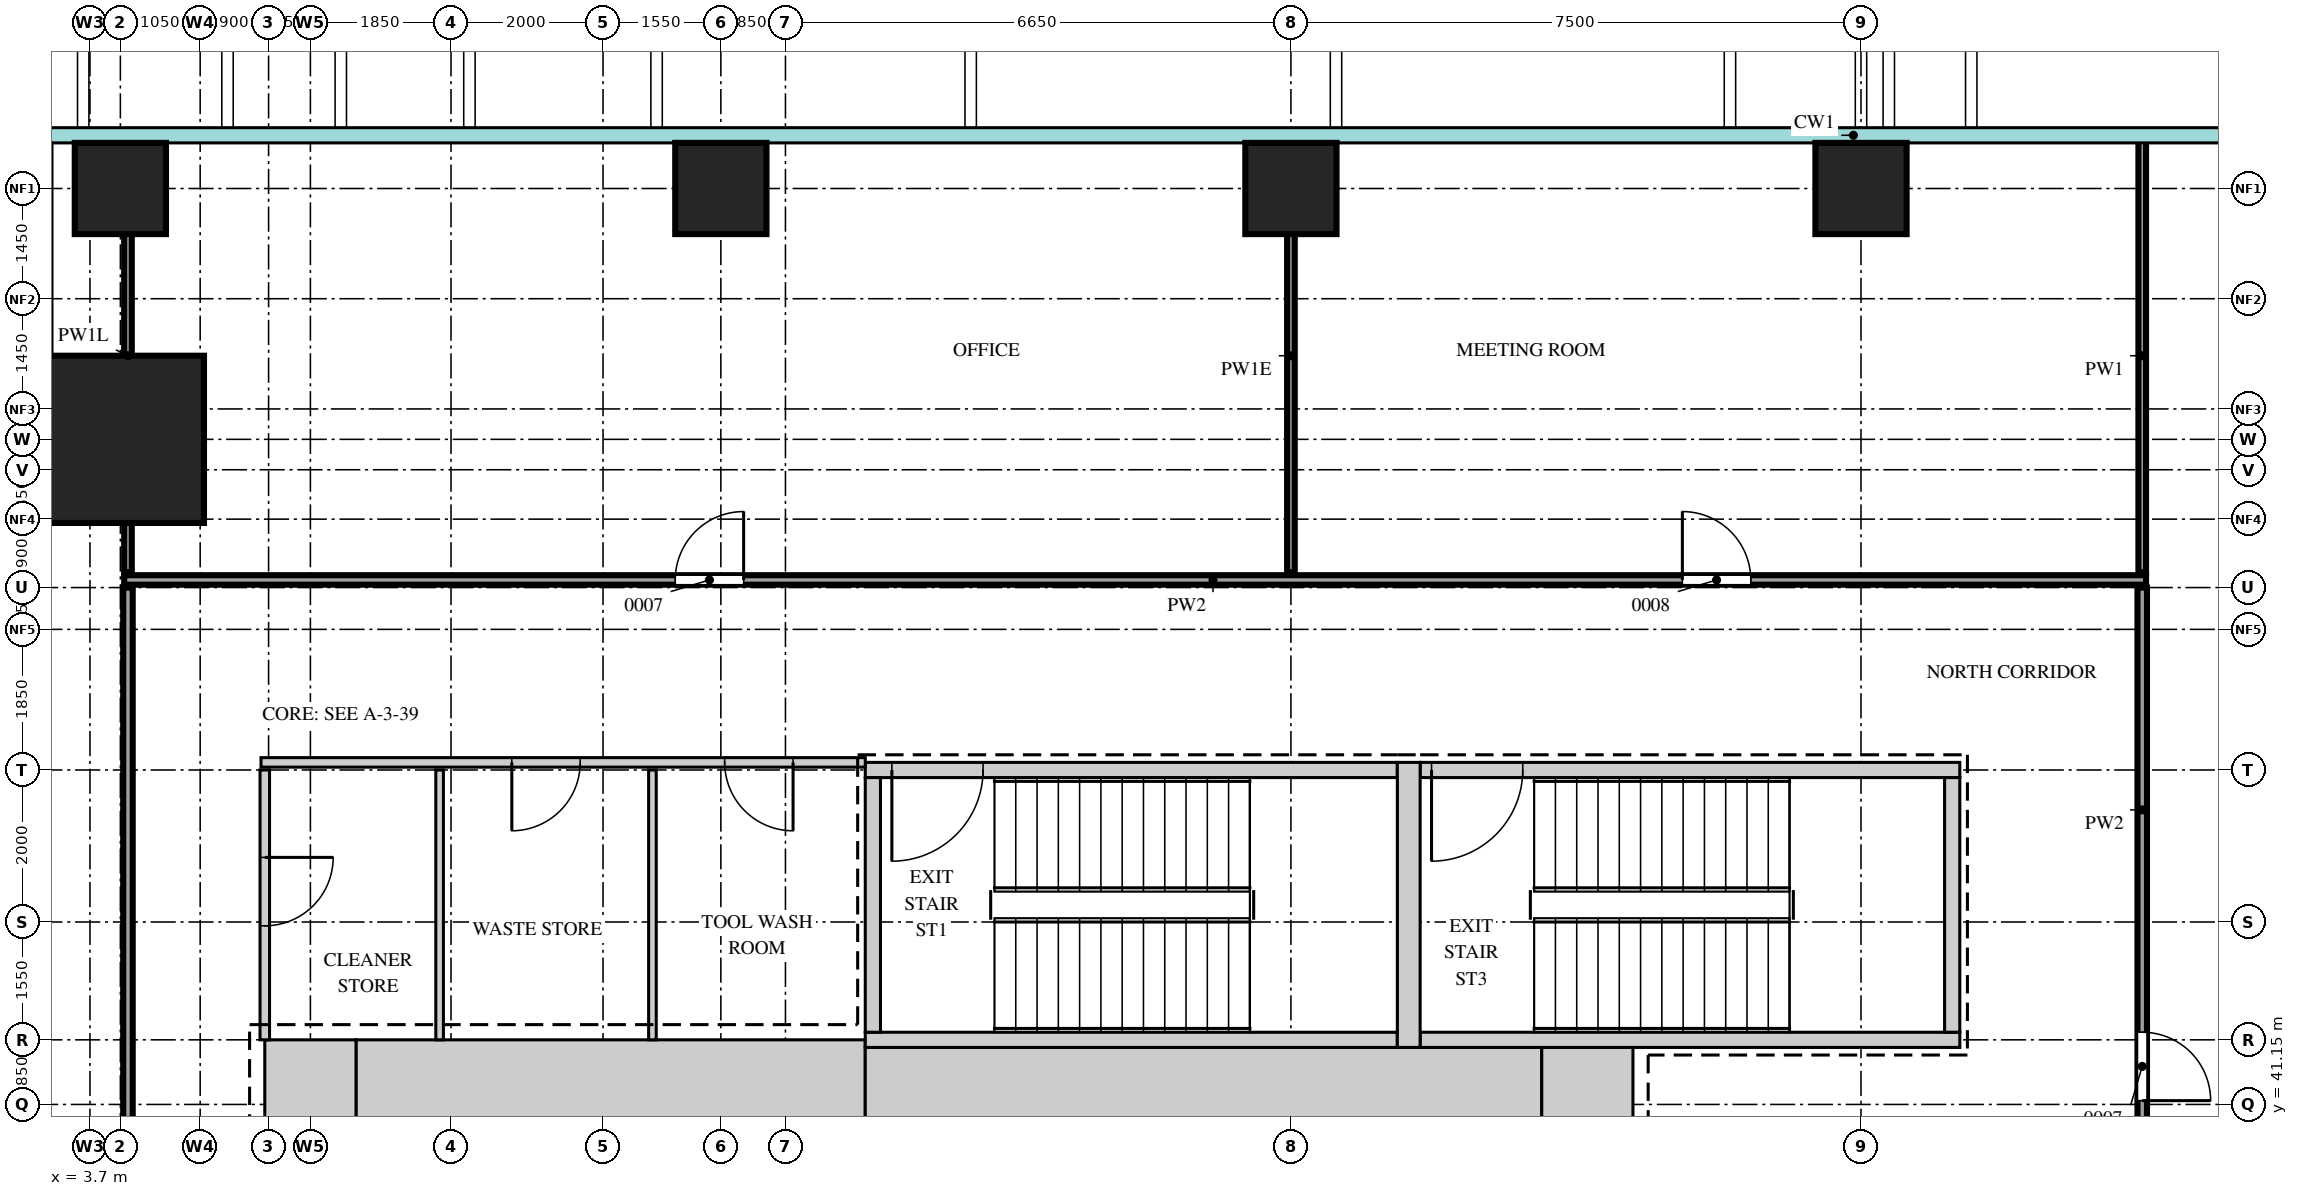
"""IFC4 building model, lengths in metres.
Left out: names, types, materials, properties, quantities, classifications, styles, units other than length and angle.
Written with IfcOpenShell. Run it as: python <this file> out.ifc"""

import sys

from ifc_helpers import new_model, si_unit, direction, frame, frame_2d, origin, origin_2d, place, context, subcontext, project, spatial, rectangle, extrude, source, transform, mapped, element, fill, save


model = new_model("IFC4")
c1 = context("Model", 3, precision=1e-05, world=origin(), true_north=direction((0.0, 1.0)))
c2 = subcontext(c1, "Body", "Model", "MODEL_VIEW")
j1 = project(units=[si_unit("LENGTHUNIT", "METRE"), si_unit("PLANEANGLEUNIT", "RADIAN")], contexts=[c1])
p1 = place(None, origin())
s1 = spatial("IfcSite", under=j1, at=p1, CompositionType="ELEMENT")
p2 = place(p1, origin())
s2 = spatial("IfcBuilding", under=s1, at=p2, CompositionType="ELEMENT")
p3 = place(p2, frame((0.0, 0.0, 60.0)))
s3 = spatial("IfcBuildingStorey", under=s2, at=p3, CompositionType="ELEMENT", Elevation=60.0)
m1 = source(origin(), c2, "Body", "SweptSolid", [
    extrude(rectangle(XDim=6.7, YDim=1.2, at=frame_2d((3.35, 0.0))), origin(), (0.0, 0.0, 1.0), 4.2),
])
p4 = place(p3, frame((7.2, 41.4, 0.0), z_axis=(0.0, 0.0, 1.0), x_axis=(1.0, 0.0, 0.0)))
e1 = element("IfcWall", 1, at=p4, inside=s3, PredefinedType="SHEAR", context=c2, shape_type="MappedRepresentation", body=[
    mapped(m1, transform((0.0, 0.0, 0.0))),
])
m2 = source(origin(), c2, "Body", "SweptSolid", [
    extrude(rectangle(XDim=8.9, YDim=1.1, at=frame_2d((4.45, 0.0))), origin(), (0.0, 0.0, 1.0), 4.2),
])
p5 = place(p3, frame((13.9, 41.35, 0.0), z_axis=(0.0, 0.0, 1.0), x_axis=(1.0, 0.0, 0.0)))
e2 = element("IfcWall", 2, at=p5, inside=s3, PredefinedType="SHEAR", context=c2, shape_type="MappedRepresentation", body=[
    mapped(m2, transform((0.0, 0.0, 0.0))),
])
m3 = source(origin(), c2, "Body", "SweptSolid", [
    extrude(rectangle(XDim=1.2, YDim=1.1, at=frame_2d((0.6, 0.0))), origin(), (0.0, 0.0, 1.0), 4.2),
])
p6 = place(p3, frame((22.8, 41.35, 0.0), z_axis=(0.0, 0.0, 1.0), x_axis=(1.0, 0.0, 0.0)))
e3 = element("IfcWall", 3, at=p6, inside=s3, PredefinedType="SHEAR", context=c2, shape_type="MappedRepresentation", body=[
    mapped(m3, transform((0.0, 0.0, 0.0))),
])
m4 = source(origin(), c2, "Body", "SweptSolid", [
    extrude(rectangle(XDim=1.2, YDim=1.2, at=frame_2d((0.6, 0.0))), origin(), (0.0, 0.0, 1.0), 4.2),
])
p7 = place(p3, frame((6.0, 41.4, 0.0), z_axis=(0.0, 0.0, 1.0), x_axis=(1.0, 0.0, 0.0)))
e4 = element("IfcWall", 4, at=p7, inside=s3, PredefinedType="SHEAR", context=c2, shape_type="MappedRepresentation", body=[
    mapped(m4, transform((0.0, 0.0, 0.0))),
])
m5 = source(origin(), c2, "Body", "SweptSolid", [
    extrude(rectangle(XDim=7.0, YDim=0.2, at=frame_2d((3.5, 0.0))), origin(), (0.0, 0.0, 1.0), 4.2),
])
p8 = place(p3, frame((13.9, 45.55, 0.0), z_axis=(0.0, 0.0, 1.0), x_axis=(1.0, 0.0, 0.0)))
e5 = element("IfcWall", 5, at=p8, inside=s3, PredefinedType="SHEAR", context=c2, shape_type="MappedRepresentation", body=[
    mapped(m5, transform((0.0, 0.0, 0.0))),
])
m6 = source(origin(), c2, "Body", "SweptSolid", [
    extrude(rectangle(XDim=1.2, YDim=2.1, at=frame_2d((0.6, 1.05))), frame((0.0, 0.11, 0.0), z_axis=(0.0, -1.0, 0.0), x_axis=(1.0, 0.0, 0.0)), (0.0, 0.0, 1.0), 0.22),
])
p9 = place(p8, frame((0.35, 0.0, 0.0)))
e6 = element("IfcOpeningElement", 6, at=p9, cuts=e5, PredefinedType="OPENING", context=c2, shape_type="MappedRepresentation", body=[
    mapped(m6, transform((0.0, 0.0, 0.0))),
])
p10 = place(p3, frame((13.9, 42.0, 0.0), z_axis=(0.0, 0.0, 1.0), x_axis=(1.0, 0.0, 0.0)))
e7 = element("IfcWall", 7, at=p10, inside=s3, PredefinedType="SHEAR", context=c2, shape_type="MappedRepresentation", body=[
    mapped(m5, transform((0.0, 0.0, 0.0))),
])
m7 = source(origin(), c2, "Body", "SweptSolid", [
    extrude(rectangle(XDim=7.1, YDim=0.2, at=frame_2d((3.55, 0.0))), origin(), (0.0, 0.0, 1.0), 4.2),
])
p11 = place(p3, frame((21.2, 45.55, 0.0), z_axis=(0.0, 0.0, 1.0), x_axis=(1.0, 0.0, 0.0)))
e8 = element("IfcWall", 8, at=p11, inside=s3, PredefinedType="SHEAR", context=c2, shape_type="MappedRepresentation", body=[
    mapped(m7, transform((0.0, 0.0, 0.0))),
])
p12 = place(p11, frame((0.15, 0.0, 0.0)))
e9 = element("IfcOpeningElement", 9, at=p12, cuts=e8, PredefinedType="OPENING", context=c2, shape_type="MappedRepresentation", body=[
    mapped(m6, transform((0.0, 0.0, 0.0))),
])
p13 = place(p3, frame((21.2, 42.0, 0.0), z_axis=(0.0, 0.0, 1.0), x_axis=(1.0, 0.0, 0.0)))
e10 = element("IfcWall", 10, at=p13, inside=s3, PredefinedType="SHEAR", context=c2, shape_type="MappedRepresentation", body=[
    mapped(m7, transform((0.0, 0.0, 0.0))),
])
m8 = source(origin(), c2, "Body", "SweptSolid", [
    extrude(rectangle(XDim=3.75, YDim=0.3, at=frame_2d((1.875, 0.0))), origin(), (0.0, 0.0, 1.0), 4.2),
])
p14 = place(p3, frame((21.05, 41.9, 0.0), z_axis=(0.0, 0.0, 1.0), x_axis=(0.0, 1.0, 0.0)))
e11 = element("IfcWall", 11, at=p14, inside=s3, PredefinedType="SHEAR", context=c2, shape_type="MappedRepresentation", body=[
    mapped(m8, transform((0.0, 0.0, 0.0))),
])
m9 = source(origin(), c2, "Body", "SweptSolid", [
    extrude(rectangle(XDim=3.35, YDim=0.2, at=frame_2d((1.675, 0.0))), origin(), (0.0, 0.0, 1.0), 4.2),
])
for number, where, z_axis, x_axis in (
    (12, (14.0, 42.1, 0.0), (0.0, 0.0, 1.0), (0.0, 1.0, 0.0)),
    (13, (28.2, 42.1, 0.0), (0.0, 0.0, 1.0), (0.0, 1.0, 0.0)),
):
    element("IfcWall", number, at=place(p3, frame(where, z_axis=z_axis, x_axis=x_axis)), inside=s3, PredefinedType="SHEAR", context=c2, shape_type="MappedRepresentation", body=[
        mapped(m9, transform((0.0, 0.0, 0.0))),
    ])
m10 = source(origin(), c2, "Body", "SweptSolid", [
    extrude(rectangle(XDim=2.2, YDim=2.2, at=origin_2d()), origin(), (0.0, 0.0, 1.0), 4.5),
])
p15 = place(p3, frame((4.1, 49.9, 0.0), z_axis=(0.0, 0.0, 1.0), x_axis=(1.0, 0.0, 0.0)))
e14 = element("IfcColumn", 14, at=p15, inside=s3, PredefinedType="COLUMN", context=c2, shape_type="MappedRepresentation", body=[
    mapped(m10, transform((0.0, 0.0, 0.0))),
])
m11 = source(origin(), c2, "Body", "SweptSolid", [
    extrude(rectangle(XDim=1.2, YDim=1.2, at=origin_2d()), origin(), (0.0, 0.0, 1.0), 4.2),
])
for number, where, z_axis, x_axis in (
    (15, (4.1, 53.2, 0.0), (0.0, 0.0, 1.0), (1.0, 0.0, 0.0)),
    (16, (12.0, 53.2, 0.0), (0.0, 0.0, 1.0), (1.0, 0.0, 0.0)),
    (17, (19.5, 53.2, 0.0), (0.0, 0.0, 1.0), (1.0, 0.0, 0.0)),
    (18, (27.0, 53.2, 0.0), (0.0, 0.0, 1.0), (1.0, 0.0, 0.0)),
):
    element("IfcColumn", number, at=place(p3, frame(where, z_axis=z_axis, x_axis=x_axis)), inside=s3, PredefinedType="COLUMN", context=c2, shape_type="MappedRepresentation", body=[
        mapped(m11, transform((0.0, 0.0, 0.0))),
    ])
m12 = source(origin(), c2, "Body", "SweptSolid", [
    extrude(rectangle(XDim=41.8, YDim=0.125, at=frame_2d((20.9, 0.0))), origin(), (0.0, 0.0, 1.0), 4.3),
])
p16 = place(p3, frame((4.2, 6.15, 0.0), z_axis=(0.0, 0.0, 1.0), x_axis=(0.0, 1.0, 0.0)))
e19 = element("IfcWall", 19, at=p16, inside=s3, PredefinedType="PARTITIONING", context=c2, shape_type="MappedRepresentation", body=[
    mapped(m12, transform((0.0, 0.0, 0.0))),
])
m13 = source(origin(), c2, "Body", "SweptSolid", [
    extrude(rectangle(XDim=0.9, YDim=2.1, at=frame_2d((0.45, 1.05))), frame((0.0, 0.073, 0.0), z_axis=(0.0, -1.0, 0.0), x_axis=(1.0, 0.0, 0.0)), (0.0, 0.0, 1.0), 0.145),
])
p17 = place(p16, frame((6.45, 0.0, 0.0)))
e20 = element("IfcOpeningElement", 20, at=p17, cuts=e19, PredefinedType="OPENING", context=c2, shape_type="MappedRepresentation", body=[
    mapped(m13, transform((0.0, 0.0, 0.0))),
])
m14 = source(origin(), c2, "Body", "SweptSolid", [
    extrude(rectangle(XDim=1.2, YDim=2.1, at=frame_2d((0.6, 1.05))), frame((0.0, 0.073, 0.0), z_axis=(0.0, -1.0, 0.0), x_axis=(1.0, 0.0, 0.0)), (0.0, 0.0, 1.0), 0.145),
])
p18 = place(p16, frame((25.05, 0.0, 0.0)))
e21 = element("IfcOpeningElement", 21, at=p18, cuts=e19, PredefinedType="OPENING", context=c2, shape_type="MappedRepresentation", body=[
    mapped(m14, transform((0.0, 0.0, 0.0))),
])
m15 = source(origin(), c2, "Body", "SweptSolid", [
    extrude(rectangle(XDim=10.15, YDim=0.125, at=frame_2d((5.075, 0.0))), origin(), (0.0, 0.0, 1.0), 4.3),
])
p19 = place(p3, frame((30.7, 37.8, 0.0), z_axis=(0.0, 0.0, 1.0), x_axis=(0.0, 1.0, 0.0)))
e22 = element("IfcWall", 22, at=p19, inside=s3, PredefinedType="PARTITIONING", context=c2, shape_type="MappedRepresentation", body=[
    mapped(m15, transform((0.0, 0.0, 0.0))),
])
p20 = place(p19, frame((3.4, 0.0, 0.0)))
e23 = element("IfcOpeningElement", 23, at=p20, cuts=e22, PredefinedType="OPENING", context=c2, shape_type="MappedRepresentation", body=[
    mapped(m13, transform((0.0, 0.0, 0.0))),
])
m16 = source(origin(), c2, "Body", "SweptSolid", [
    extrude(rectangle(XDim=3.55, YDim=0.125, at=frame_2d((1.775, 0.0))), origin(), (0.0, 0.0, 1.0), 4.3),
])
p21 = place(p3, frame((6.0, 42.0, 0.0), z_axis=(0.0, 0.0, 1.0), x_axis=(0.0, 1.0, 0.0)))
e24 = element("IfcWall", 24, at=p21, inside=s3, PredefinedType="PARTITIONING", context=c2, shape_type="MappedRepresentation", body=[
    mapped(m16, transform((0.0, 0.0, 0.0))),
])
p22 = place(p21, frame((1.5, 0.0, 0.0)))
e25 = element("IfcOpeningElement", 25, at=p22, cuts=e24, PredefinedType="OPENING", context=c2, shape_type="MappedRepresentation", body=[
    mapped(m13, transform((0.0, 0.0, 0.0))),
])
m17 = source(origin(), c2, "Body", "SweptSolid", [
    extrude(rectangle(XDim=3.55, YDim=0.1, at=frame_2d((1.775, 0.0))), origin(), (0.0, 0.0, 1.0), 4.3),
])
for number, where, z_axis, x_axis in (
    (26, (8.3, 42.0, 0.0), (0.0, 0.0, 1.0), (0.0, 1.0, 0.0)),
    (27, (11.1, 42.0, 0.0), (0.0, 0.0, 1.0), (0.0, 1.0, 0.0)),
):
    element("IfcWall", number, at=place(p3, frame(where, z_axis=z_axis, x_axis=x_axis)), inside=s3, PredefinedType="PARTITIONING", context=c2, shape_type="MappedRepresentation", body=[
        mapped(m17, transform((0.0, 0.0, 0.0))),
    ])
m18 = source(origin(), c2, "Body", "SweptSolid", [
    extrude(rectangle(XDim=7.95, YDim=0.125, at=frame_2d((3.975, 0.0))), origin(), (0.0, 0.0, 1.0), 4.3),
])
p23 = place(p3, frame((5.95, 45.65, 0.0), z_axis=(0.0, 0.0, 1.0), x_axis=(1.0, 0.0, 0.0)))
e28 = element("IfcWall", 28, at=p23, inside=s3, PredefinedType="PARTITIONING", context=c2, shape_type="MappedRepresentation", body=[
    mapped(m18, transform((0.0, 0.0, 0.0))),
])
p24 = place(p23, frame((3.3, 0.0, 0.0)))
e29 = element("IfcOpeningElement", 29, at=p24, cuts=e28, PredefinedType="OPENING", context=c2, shape_type="MappedRepresentation", body=[
    mapped(m13, transform((0.0, 0.0, 0.0))),
])
p25 = place(p23, frame((6.1, 0.0, 0.0)))
e30 = element("IfcOpeningElement", 30, at=p25, cuts=e28, PredefinedType="OPENING", context=c2, shape_type="MappedRepresentation", body=[
    mapped(m13, transform((0.0, 0.0, 0.0))),
])
m19 = source(origin(), c2, "Body", "SweptSolid", [
    extrude(rectangle(XDim=26.6, YDim=0.125, at=frame_2d((13.3, 0.0))), origin(), (0.0, 0.0, 1.0), 4.3),
])
p26 = place(p3, frame((4.15, 48.05, 0.0), z_axis=(0.0, 0.0, 1.0), x_axis=(1.0, 0.0, 0.0)))
e31 = element("IfcWall", 31, at=p26, inside=s3, PredefinedType="PARTITIONING", context=c2, shape_type="MappedRepresentation", body=[
    mapped(m19, transform((0.0, 0.0, 0.0))),
])
p27 = place(p26, frame((7.25, 0.0, 0.0)))
e32 = element("IfcOpeningElement", 32, at=p27, cuts=e31, PredefinedType="OPENING", context=c2, shape_type="MappedRepresentation", body=[
    mapped(m13, transform((0.0, 0.0, 0.0))),
])
p28 = place(p26, frame((20.5, 0.0, 0.0)))
e33 = element("IfcOpeningElement", 33, at=p28, cuts=e31, PredefinedType="OPENING", context=c2, shape_type="MappedRepresentation", body=[
    mapped(m13, transform((0.0, 0.0, 0.0))),
])
m20 = source(origin(), c2, "Body", "SweptSolid", [
    extrude(rectangle(XDim=5.7, YDim=0.1, at=frame_2d((2.85, 0.0))), origin(), (0.0, 0.0, 1.0), 3.6),
])
p29 = place(p3, frame((4.2, 48.15, 0.0), z_axis=(0.0, 0.0, 1.0), x_axis=(0.0, 1.0, 0.0)))
e34 = element("IfcWall", 34, at=p29, inside=s3, PredefinedType="PARTITIONING", context=c2, shape_type="MappedRepresentation", body=[
    mapped(m20, transform((0.0, 0.0, 0.0))),
])
m21 = source(origin(), c2, "Body", "SweptSolid", [
    extrude(rectangle(XDim=5.7, YDim=0.1, at=frame_2d((2.85, 0.0))), origin(), (0.0, 0.0, 1.0), 3.84),
])
p30 = place(p3, frame((19.5, 48.15, 0.0), z_axis=(0.0, 0.0, 1.0), x_axis=(0.0, 1.0, 0.0)))
e35 = element("IfcWall", 35, at=p30, inside=s3, PredefinedType="PARTITIONING", context=c2, shape_type="MappedRepresentation", body=[
    mapped(m21, transform((0.0, 0.0, 0.0))),
])
m22 = source(origin(), c2, "Body", "SweptSolid", [
    extrude(rectangle(XDim=5.7, YDim=0.1, at=frame_2d((2.85, 0.0))), origin(), (0.0, 0.0, 1.0), 4.3),
])
p31 = place(p3, frame((30.7, 48.15, 0.0), z_axis=(0.0, 0.0, 1.0), x_axis=(0.0, 1.0, 0.0)))
e36 = element("IfcWall", 36, at=p31, inside=s3, PredefinedType="PARTITIONING", context=c2, shape_type="MappedRepresentation", body=[
    mapped(m22, transform((0.0, 0.0, 0.0))),
])
m23 = source(origin(), c2, "Body", "SweptSolid", [
    extrude(rectangle(XDim=0.9, YDim=2.1, at=frame_2d((0.45, 1.05))), frame((0.0, 0.025, 0.0), z_axis=(0.0, -1.0, 0.0), x_axis=(1.0, 0.0, 0.0)), (0.0, 0.0, 1.0), 0.05),
])
p32 = place(p20, origin())
e37 = element("IfcDoor", 37, at=p32, inside=s3, OperationType="SINGLE_SWING_LEFT", PredefinedType="DOOR", context=c2, shape_type="MappedRepresentation", body=[
    mapped(m23, transform((0.0, 0.0, 0.0))),
])
fill(e23, e37)
p33 = place(p27, origin())
e38 = element("IfcDoor", 38, at=p33, inside=s3, OperationType="SINGLE_SWING_LEFT", PredefinedType="DOOR", context=c2, shape_type="MappedRepresentation", body=[
    mapped(m23, transform((0.0, 0.0, 0.0))),
])
fill(e32, e38)
p34 = place(p28, origin())
e39 = element("IfcDoor", 39, at=p34, inside=s3, OperationType="SINGLE_SWING_RIGHT", PredefinedType="DOOR", context=c2, shape_type="MappedRepresentation", body=[
    mapped(m23, transform((0.0, 0.0, 0.0))),
])
fill(e33, e39)
p35 = place(p22, origin())
e40 = element("IfcDoor", 40, at=p35, inside=s3, OperationType="SINGLE_SWING_RIGHT", PredefinedType="DOOR", context=c2, shape_type="MappedRepresentation", body=[
    mapped(m23, transform((0.0, 0.0, 0.0))),
])
fill(e25, e40)
p36 = place(p24, origin())
e41 = element("IfcDoor", 41, at=p36, inside=s3, OperationType="SINGLE_SWING_LEFT", PredefinedType="DOOR", context=c2, shape_type="MappedRepresentation", body=[
    mapped(m23, transform((0.0, 0.0, 0.0))),
])
fill(e29, e41)
p37 = place(p25, origin())
e42 = element("IfcDoor", 42, at=p37, inside=s3, OperationType="SINGLE_SWING_RIGHT", PredefinedType="DOOR", context=c2, shape_type="MappedRepresentation", body=[
    mapped(m23, transform((0.0, 0.0, 0.0))),
])
fill(e30, e42)
m24 = source(origin(), c2, "Body", "SweptSolid", [
    extrude(rectangle(XDim=1.2, YDim=2.1, at=frame_2d((0.6, 1.05))), frame((0.0, 0.025, 0.0), z_axis=(0.0, -1.0, 0.0), x_axis=(1.0, 0.0, 0.0)), (0.0, 0.0, 1.0), 0.05),
])
p38 = place(p9, origin())
e43 = element("IfcDoor", 43, at=p38, inside=s3, OperationType="SINGLE_SWING_LEFT", PredefinedType="DOOR", context=c2, shape_type="MappedRepresentation", body=[
    mapped(m24, transform((0.0, 0.0, 0.0))),
])
fill(e6, e43)
p39 = place(p12, origin())
e44 = element("IfcDoor", 44, at=p39, inside=s3, OperationType="SINGLE_SWING_LEFT", PredefinedType="DOOR", context=c2, shape_type="MappedRepresentation", body=[
    mapped(m24, transform((0.0, 0.0, 0.0))),
])
fill(e9, e44)
save(model, sys.argv[1])
